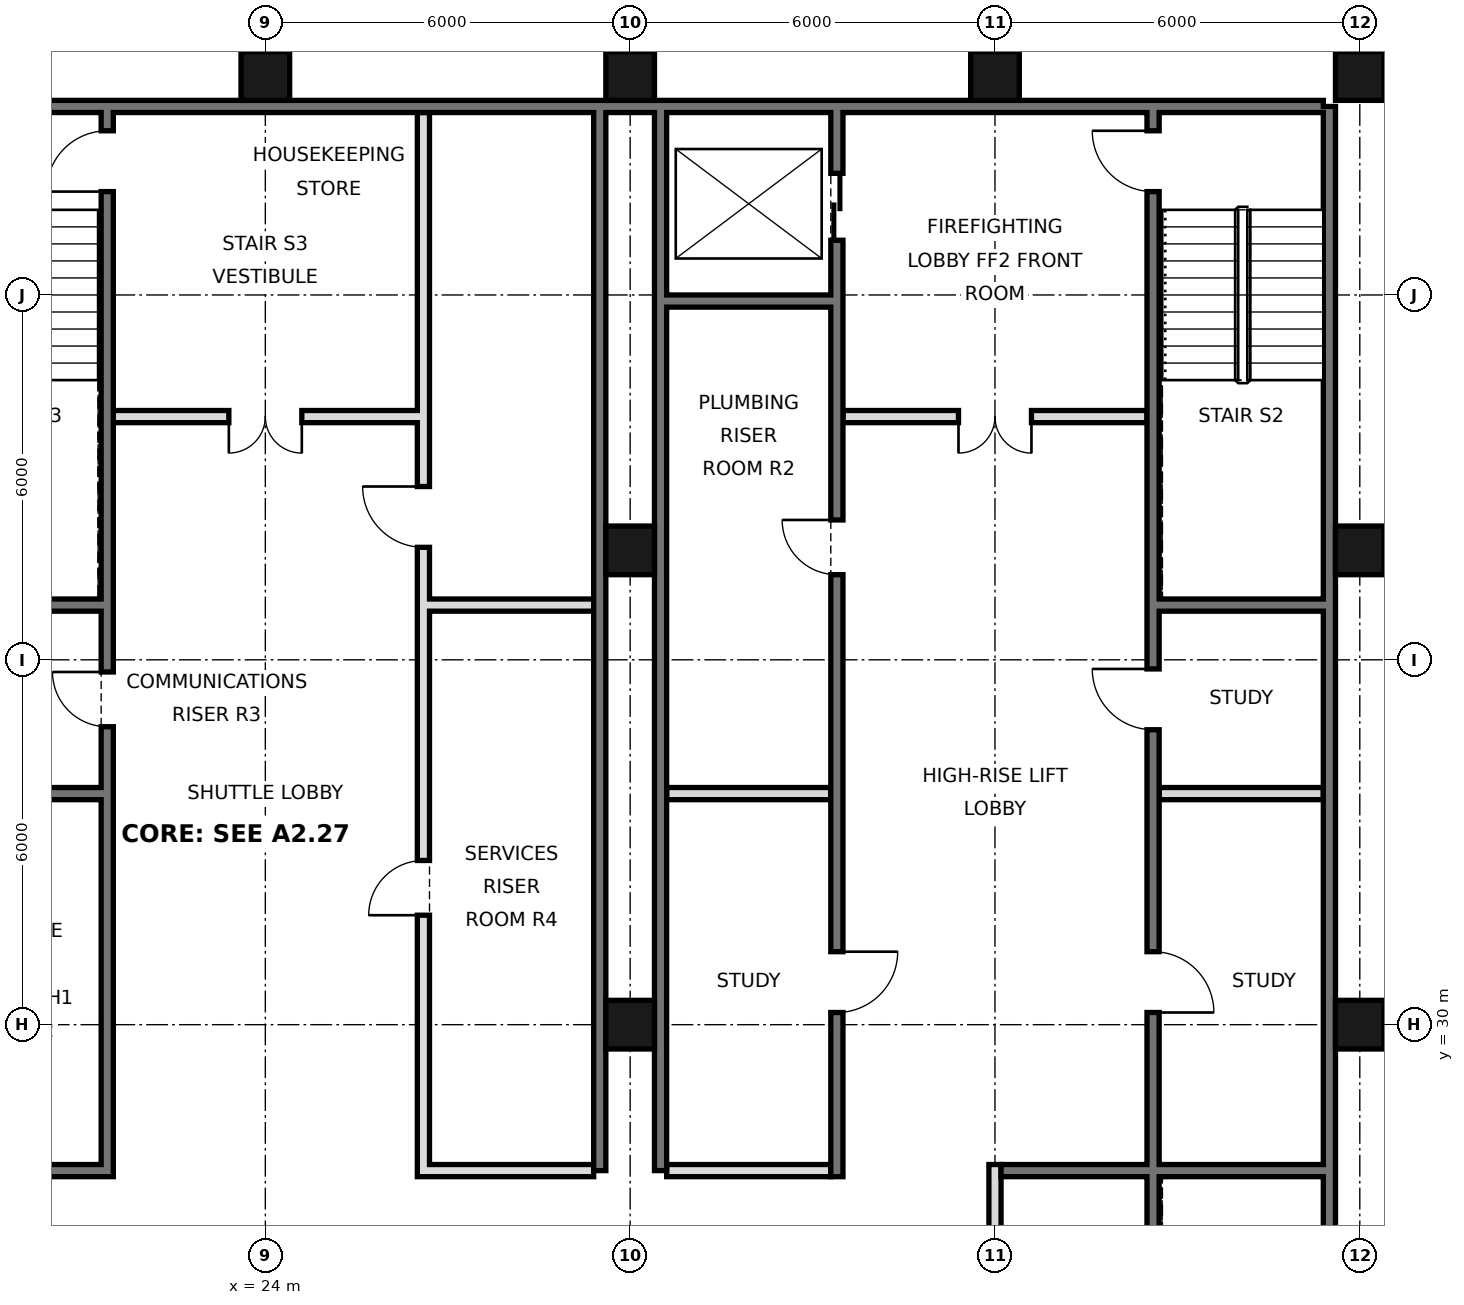
"""IFC4 building model, lengths in metres.
Left out: names, types, materials, properties, quantities, classifications, styles, units other than length and angle.
Written with IfcOpenShell. Run it as: python <this file> out.ifc"""

import sys

from ifc_helpers import new_model, si_unit, direction, frame, frame_2d, origin, origin_2d, place, context, subcontext, project, spatial, rectangle, hollow_rectangle, extrude, element, fill, save


model = new_model("IFC4")
c1 = context("Model", 3, precision=1e-05, world=origin(), true_north=direction((0.0, 1.0)))
c2 = subcontext(c1, "Body", "Model", "MODEL_VIEW")
j1 = project(units=[si_unit("LENGTHUNIT", "METRE"), si_unit("PLANEANGLEUNIT", "RADIAN")], contexts=[c1])
p1 = place(None, origin())
s1 = spatial("IfcSite", under=j1, at=p1, CompositionType="ELEMENT")
p2 = place(p1, origin())
s2 = spatial("IfcBuilding", under=s1, at=p2, CompositionType="ELEMENT")
p3 = place(p2, frame((0.0, 0.0, 107.0)))
s3 = spatial("IfcBuildingStorey", under=s2, at=p3, CompositionType="ELEMENT", Elevation=107.0)
for number, where, z_axis, x_axis in (
    (1, (24.0, 45.6, 0.0), (0.0, 0.0, 1.0), (1.0, 0.0, 0.0)),
    (2, (30.0, 30.0, 0.0), (0.0, 0.0, 1.0), (1.0, 0.0, 0.0)),
    (3, (30.0, 37.8, 0.0), (0.0, 0.0, 1.0), (1.0, 0.0, 0.0)),
    (4, (30.0, 45.6, 0.0), (0.0, 0.0, 1.0), (1.0, 0.0, 0.0)),
    (5, (36.0, 45.6, 0.0), (0.0, 0.0, 1.0), (1.0, 0.0, 0.0)),
    (6, (42.0, 30.0, 0.0), (0.0, 0.0, 1.0), (1.0, 0.0, 0.0)),
    (7, (42.0, 37.8, 0.0), (0.0, 0.0, 1.0), (1.0, 0.0, 0.0)),
    (8, (42.0, 45.6, 0.0), (0.0, 0.0, 1.0), (1.0, 0.0, 0.0)),
):
    element("IfcColumn", number, at=place(p3, frame(where, z_axis=z_axis, x_axis=x_axis)), inside=s3, PredefinedType="COLUMN", context=c2, shape_type="SweptSolid", body=[
        extrude(hollow_rectangle(XDim=0.8, YDim=0.8, WallThickness=0.05, at=origin_2d()), origin(), (0.0, 0.0, 1.0), 3.6),
    ])
p4 = place(p3, frame((41.5, 21.6, 0.0), z_axis=(0.0, 0.0, 1.0), x_axis=(0.0, 1.0, 0.0)))
e9 = element("IfcWall", 9, at=p4, inside=s3, PredefinedType="SOLIDWALL", context=c2, shape_type="SweptSolid", body=[
    extrude(rectangle(XDim=23.5, YDim=0.2, at=frame_2d((11.75, 0.0))), origin(), (0.0, 0.0, 1.0), 3.42),
])
p5 = place(p3, frame((6.6, 45.1, 0.0), z_axis=(0.0, 0.0, 1.0), x_axis=(1.0, 0.0, 0.0)))
e10 = element("IfcWall", 10, at=p5, inside=s3, PredefinedType="SOLIDWALL", context=c2, shape_type="SweptSolid", body=[
    extrude(rectangle(XDim=34.8, YDim=0.2, at=frame_2d((17.4, 0.0))), origin(), (0.0, 0.0, 1.0), 3.42),
])
for number, where, z_axis, x_axis in (
    (11, (29.5, 27.6, 0.0), (0.0, 0.0, 1.0), (0.0, 1.0, 0.0)),
    (12, (30.5, 27.6, 0.0), (0.0, 0.0, 1.0), (0.0, 1.0, 0.0)),
):
    element("IfcWall", number, at=place(p3, frame(where, z_axis=z_axis, x_axis=x_axis)), inside=s3, PredefinedType="SOLIDWALL", context=c2, shape_type="SweptSolid", body=[
        extrude(rectangle(XDim=17.5, YDim=0.2, at=frame_2d((8.75, 0.0))), origin(), (0.0, 0.0, 1.0), 3.42),
    ])
p6 = place(p3, frame((21.4, 27.5, 0.0), z_axis=(0.0, 0.0, 1.0), x_axis=(0.0, 1.0, 0.0)))
e13 = element("IfcWall", 13, at=p6, inside=s3, PredefinedType="SOLIDWALL", context=c2, shape_type="SweptSolid", body=[
    extrude(rectangle(XDim=17.5, YDim=0.2, at=frame_2d((8.75, 0.0))), origin(), (0.0, 0.0, 1.0), 3.42),
])
p7 = place(p6, frame((16.2, 0.0, 0.0)))
e14 = element("IfcOpeningElement", 14, at=p7, cuts=e13, PredefinedType="OPENING", context=c2, shape_type="SweptSolid", body=[
    extrude(rectangle(XDim=1.0, YDim=2.1, at=frame_2d((0.5, 1.05))), frame((0.0, 0.11, 0.0), z_axis=(0.0, -1.0, 0.0), x_axis=(1.0, 0.0, 0.0)), (0.0, 0.0, 1.0), 0.22),
])
p8 = place(p6, frame((7.4, 0.0, 0.0)))
e15 = element("IfcOpeningElement", 15, at=p8, cuts=e13, PredefinedType="OPENING", context=c2, shape_type="SweptSolid", body=[
    extrude(rectangle(XDim=0.9, YDim=2.1, at=frame_2d((0.45, 1.05))), frame((0.0, 0.11, 0.0), z_axis=(0.0, -1.0, 0.0), x_axis=(1.0, 0.0, 0.0)), (0.0, 0.0, 1.0), 0.22),
])
p9 = place(p3, frame((26.6, 27.5, 0.0), z_axis=(0.0, 0.0, 1.0), x_axis=(0.0, 1.0, 0.0)))
e16 = element("IfcWall", 16, at=p9, inside=s3, PredefinedType="SOLIDWALL", context=c2, shape_type="SweptSolid", body=[
    extrude(rectangle(XDim=17.5, YDim=0.2, at=frame_2d((8.75, 0.0))), origin(), (0.0, 0.0, 1.0), 3.42),
])
p10 = place(p9, frame((4.3, 0.0, 0.0)))
e17 = element("IfcOpeningElement", 17, at=p10, cuts=e16, PredefinedType="OPENING", context=c2, shape_type="SweptSolid", body=[
    extrude(rectangle(XDim=0.9, YDim=2.1, at=frame_2d((0.45, 1.05))), frame((0.0, 0.11, 0.0), z_axis=(0.0, -1.0, 0.0), x_axis=(1.0, 0.0, 0.0)), (0.0, 0.0, 1.0), 0.22),
])
p11 = place(p9, frame((10.35, 0.0, 0.0)))
e18 = element("IfcOpeningElement", 18, at=p11, cuts=e16, PredefinedType="OPENING", context=c2, shape_type="SweptSolid", body=[
    extrude(rectangle(XDim=1.0, YDim=2.1, at=frame_2d((0.5, 1.05))), frame((0.0, 0.11, 0.0), z_axis=(0.0, -1.0, 0.0), x_axis=(1.0, 0.0, 0.0)), (0.0, 0.0, 1.0), 0.22),
])
p12 = place(p3, frame((33.4, 27.5, 0.0), z_axis=(0.0, 0.0, 1.0), x_axis=(0.0, 1.0, 0.0)))
e19 = element("IfcWall", 19, at=p12, inside=s3, PredefinedType="SOLIDWALL", context=c2, shape_type="SweptSolid", body=[
    extrude(rectangle(XDim=17.5, YDim=0.2, at=frame_2d((8.75, 0.0))), origin(), (0.0, 0.0, 1.0), 3.42),
])
p13 = place(p12, frame((15.4, 0.0, 0.0)))
e20 = element("IfcOpeningElement", 20, at=p13, cuts=e19, PredefinedType="OPENING", context=c2, shape_type="SweptSolid", body=[
    extrude(rectangle(XDim=1.1, YDim=2.1, at=frame_2d((0.55, 1.05))), frame((0.0, 0.11, 0.0), z_axis=(0.0, -1.0, 0.0), x_axis=(1.0, 0.0, 0.0)), (0.0, 0.0, 1.0), 0.22),
])
p14 = place(p12, frame((2.7, 0.0, 0.0)))
e21 = element("IfcOpeningElement", 21, at=p14, cuts=e19, PredefinedType="OPENING", context=c2, shape_type="SweptSolid", body=[
    extrude(rectangle(XDim=1.0, YDim=2.1, at=frame_2d((0.5, 1.05))), frame((0.0, 0.11, 0.0), z_axis=(0.0, -1.0, 0.0), x_axis=(1.0, 0.0, 0.0)), (0.0, 0.0, 1.0), 0.22),
])
p15 = place(p12, frame((9.9, 0.0, 0.0)))
e22 = element("IfcOpeningElement", 22, at=p15, cuts=e19, PredefinedType="OPENING", context=c2, shape_type="SweptSolid", body=[
    extrude(rectangle(XDim=0.9, YDim=2.1, at=frame_2d((0.45, 1.05))), frame((0.0, 0.11, 0.0), z_axis=(0.0, -1.0, 0.0), x_axis=(1.0, 0.0, 0.0)), (0.0, 0.0, 1.0), 0.22),
])
p16 = place(p3, frame((36.0, 21.6, 0.0), z_axis=(0.0, 0.0, 1.0), x_axis=(0.0, 1.0, 0.0)))
e23 = element("IfcWall", 23, at=p16, inside=s3, PredefinedType="PARTITIONING", context=c2, shape_type="SweptSolid", body=[
    extrude(rectangle(XDim=6.1, YDim=0.2, at=frame_2d((3.05, 0.0))), origin(), (0.0, 0.0, 1.0), 3.42),
])
p17 = place(p3, frame((38.6, 21.6, 0.0), z_axis=(0.0, 0.0, 1.0), x_axis=(0.0, 1.0, 0.0)))
e24 = element("IfcWall", 24, at=p17, inside=s3, PredefinedType="SOLIDWALL", context=c2, shape_type="SweptSolid", body=[
    extrude(rectangle(XDim=23.4, YDim=0.2, at=frame_2d((11.7, 0.0))), origin(), (0.0, 0.0, 1.0), 3.42),
])
p18 = place(p17, frame((8.6, 0.0, 0.0)))
e25 = element("IfcOpeningElement", 25, at=p18, cuts=e24, PredefinedType="OPENING", context=c2, shape_type="SweptSolid", body=[
    extrude(rectangle(XDim=1.0, YDim=2.1, at=frame_2d((0.5, 1.05))), frame((0.0, 0.11, 0.0), z_axis=(0.0, -1.0, 0.0), x_axis=(1.0, 0.0, 0.0)), (0.0, 0.0, 1.0), 0.22),
])
p19 = place(p17, frame((13.25, 0.0, 0.0)))
e26 = element("IfcOpeningElement", 26, at=p19, cuts=e24, PredefinedType="OPENING", context=c2, shape_type="SweptSolid", body=[
    extrude(rectangle(XDim=1.0, YDim=2.1, at=frame_2d((0.5, 1.05))), frame((0.0, 0.11, 0.0), z_axis=(0.0, -1.0, 0.0), x_axis=(1.0, 0.0, 0.0)), (0.0, 0.0, 1.0), 0.22),
])
p20 = place(p17, frame((22.1, 0.0, 0.0)))
e27 = element("IfcOpeningElement", 27, at=p20, cuts=e24, PredefinedType="OPENING", context=c2, shape_type="SweptSolid", body=[
    extrude(rectangle(XDim=1.0, YDim=2.1, at=frame_2d((0.5, 1.05))), frame((0.0, 0.11, 0.0), z_axis=(0.0, -1.0, 0.0), x_axis=(1.0, 0.0, 0.0)), (0.0, 0.0, 1.0), 0.22),
])
p21 = place(p17, frame((0.175, 0.0, 0.0)))
e28 = element("IfcOpeningElement", 28, at=p21, cuts=e24, PredefinedType="OPENING", context=c2, shape_type="SweptSolid", body=[
    extrude(rectangle(XDim=0.9, YDim=2.1, at=frame_2d((0.45, 1.05))), frame((0.0, 0.11, 0.0), z_axis=(0.0, -1.0, 0.0), x_axis=(1.0, 0.0, 0.0)), (0.0, 0.0, 1.0), 0.22),
])
for number, where, z_axis, x_axis in (
    (29, (18.6, 27.6, 0.0), (0.0, 0.0, 1.0), (1.0, 0.0, 0.0)),
    (30, (26.7, 27.6, 0.0), (0.0, 0.0, 1.0), (1.0, 0.0, 0.0)),
):
    element("IfcWall", number, at=place(p3, frame(where, z_axis=z_axis, x_axis=x_axis)), inside=s3, PredefinedType="SOLIDWALL", context=c2, shape_type="SweptSolid", body=[
        extrude(rectangle(XDim=2.7, YDim=0.2, at=frame_2d((1.35, 0.0))), origin(), (0.0, 0.0, 1.0), 3.42),
    ])
p22 = place(p3, frame((30.6, 27.6, 0.0), z_axis=(0.0, 0.0, 1.0), x_axis=(1.0, 0.0, 0.0)))
e31 = element("IfcWall", 31, at=p22, inside=s3, PredefinedType="PARTITIONING", context=c2, shape_type="SweptSolid", body=[
    extrude(rectangle(XDim=2.7, YDim=0.2, at=frame_2d((1.35, 0.0))), origin(), (0.0, 0.0, 1.0), 3.42),
])
p23 = place(p3, frame((36.1, 27.6, 0.0), z_axis=(0.0, 0.0, 1.0), x_axis=(1.0, 0.0, 0.0)))
e32 = element("IfcWall", 32, at=p23, inside=s3, PredefinedType="SOLIDWALL", context=c2, shape_type="SweptSolid", body=[
    extrude(rectangle(XDim=5.3, YDim=0.2, at=frame_2d((2.65, 0.0))), origin(), (0.0, 0.0, 1.0), 3.42),
])
for number, where, z_axis, x_axis in (
    (33, (18.6, 33.8, 0.0), (0.0, 0.0, 1.0), (1.0, 0.0, 0.0)),
    (34, (30.6, 33.8, 0.0), (0.0, 0.0, 1.0), (1.0, 0.0, 0.0)),
):
    element("IfcWall", number, at=place(p3, frame(where, z_axis=z_axis, x_axis=x_axis)), inside=s3, PredefinedType="SOLIDWALL", context=c2, shape_type="SweptSolid", body=[
        extrude(rectangle(XDim=2.7, YDim=0.2, at=frame_2d((1.35, 0.0))), origin(), (0.0, 0.0, 1.0), 3.42),
    ])
p24 = place(p3, frame((38.7, 33.8, 0.0), z_axis=(0.0, 0.0, 1.0), x_axis=(1.0, 0.0, 0.0)))
e35 = element("IfcWall", 35, at=p24, inside=s3, PredefinedType="PARTITIONING", context=c2, shape_type="SweptSolid", body=[
    extrude(rectangle(XDim=2.7, YDim=0.2, at=frame_2d((1.35, 0.0))), origin(), (0.0, 0.0, 1.0), 3.42),
])
for number, where, z_axis, x_axis in (
    (36, (18.6, 36.9, 0.0), (0.0, 0.0, 1.0), (1.0, 0.0, 0.0)),
    (37, (26.7, 36.9, 0.0), (0.0, 0.0, 1.0), (1.0, 0.0, 0.0)),
    (38, (38.7, 36.9, 0.0), (0.0, 0.0, 1.0), (1.0, 0.0, 0.0)),
):
    element("IfcWall", number, at=place(p3, frame(where, z_axis=z_axis, x_axis=x_axis)), inside=s3, PredefinedType="SOLIDWALL", context=c2, shape_type="SweptSolid", body=[
        extrude(rectangle(XDim=2.7, YDim=0.2, at=frame_2d((1.35, 0.0))), origin(), (0.0, 0.0, 1.0), 3.42),
    ])
p25 = place(p3, frame((21.5, 40.0, 0.0), z_axis=(0.0, 0.0, 1.0), x_axis=(1.0, 0.0, 0.0)))
e39 = element("IfcWall", 39, at=p25, inside=s3, PredefinedType="PARTITIONING", context=c2, shape_type="SweptSolid", body=[
    extrude(rectangle(XDim=5.0, YDim=0.2, at=frame_2d((2.5, 0.0))), origin(), (0.0, 0.0, 1.0), 3.42),
])
p26 = place(p25, frame((1.9, 0.0, 0.0)))
e40 = element("IfcOpeningElement", 40, at=p26, cuts=e39, PredefinedType="OPENING", context=c2, shape_type="SweptSolid", body=[
    extrude(rectangle(XDim=1.2, YDim=2.1, at=frame_2d((0.6, 1.05))), frame((0.0, 0.11, 0.0), z_axis=(0.0, -1.0, 0.0), x_axis=(1.0, 0.0, 0.0)), (0.0, 0.0, 1.0), 0.22),
])
p27 = place(p3, frame((33.5, 40.0, 0.0), z_axis=(0.0, 0.0, 1.0), x_axis=(1.0, 0.0, 0.0)))
e41 = element("IfcWall", 41, at=p27, inside=s3, PredefinedType="PARTITIONING", context=c2, shape_type="SweptSolid", body=[
    extrude(rectangle(XDim=5.0, YDim=0.2, at=frame_2d((2.5, 0.0))), origin(), (0.0, 0.0, 1.0), 3.42),
])
p28 = place(p27, frame((1.9, 0.0, 0.0)))
e42 = element("IfcOpeningElement", 42, at=p28, cuts=e41, PredefinedType="OPENING", context=c2, shape_type="SweptSolid", body=[
    extrude(rectangle(XDim=1.2, YDim=2.1, at=frame_2d((0.6, 1.05))), frame((0.0, 0.11, 0.0), z_axis=(0.0, -1.0, 0.0), x_axis=(1.0, 0.0, 0.0)), (0.0, 0.0, 1.0), 0.22),
])
p29 = place(p3, frame((30.6, 41.9, 0.0), z_axis=(0.0, 0.0, 1.0), x_axis=(1.0, 0.0, 0.0)))
e43 = element("IfcWall", 43, at=p29, inside=s3, PredefinedType="SOLIDWALL", context=c2, shape_type="SweptSolid", body=[
    extrude(rectangle(XDim=2.7, YDim=0.2, at=frame_2d((1.35, 0.0))), origin(), (0.0, 0.0, 1.0), 3.42),
])
p30 = place(p26, frame((1.2, 0.0, 0.0), z_axis=(0.0, 0.0, 1.0), x_axis=(-1.0, 0.0, 0.0)))
e44 = element("IfcDoor", 44, at=p30, inside=s3, OperationType="DOUBLE_DOOR_SINGLE_SWING", PredefinedType="DOOR", context=c2, shape_type="SweptSolid", body=[
    extrude(rectangle(XDim=1.2, YDim=2.1, at=frame_2d((0.6, 1.05))), frame((0.0, 0.025, 0.0), z_axis=(0.0, -1.0, 0.0), x_axis=(1.0, 0.0, 0.0)), (0.0, 0.0, 1.0), 0.05),
])
fill(e40, e44)
p31 = place(p28, frame((1.2, 0.0, 0.0), z_axis=(0.0, 0.0, 1.0), x_axis=(-1.0, 0.0, 0.0)))
e45 = element("IfcDoor", 45, at=p31, inside=s3, OperationType="DOUBLE_DOOR_SINGLE_SWING", PredefinedType="DOOR", context=c2, shape_type="SweptSolid", body=[
    extrude(rectangle(XDim=1.2, YDim=2.1, at=frame_2d((0.6, 1.05))), frame((0.0, 0.025, 0.0), z_axis=(0.0, -1.0, 0.0), x_axis=(1.0, 0.0, 0.0)), (0.0, 0.0, 1.0), 0.05),
])
fill(e42, e45)
p32 = place(p13, origin())
e46 = element("IfcDoor", 46, at=p32, inside=s3, OperationType="DOUBLE_DOOR_SLIDING", PredefinedType="DOOR", context=c2, shape_type="SweptSolid", body=[
    extrude(rectangle(XDim=1.1, YDim=2.1, at=frame_2d((0.55, 1.05))), frame((0.0, 0.025, 0.0), z_axis=(0.0, -1.0, 0.0), x_axis=(1.0, 0.0, 0.0)), (0.0, 0.0, 1.0), 0.05),
])
fill(e20, e46)
p33 = place(p18, frame((1.0, 0.0, 0.0), z_axis=(0.0, 0.0, 1.0), x_axis=(-1.0, 0.0, 0.0)))
e47 = element("IfcDoor", 47, at=p33, inside=s3, OperationType="SINGLE_SWING_RIGHT", PredefinedType="DOOR", context=c2, shape_type="SweptSolid", body=[
    extrude(rectangle(XDim=1.0, YDim=2.1, at=frame_2d((0.5, 1.05))), frame((0.0, 0.025, 0.0), z_axis=(0.0, -1.0, 0.0), x_axis=(1.0, 0.0, 0.0)), (0.0, 0.0, 1.0), 0.05),
])
fill(e25, e47)
p34 = place(p19, frame((1.0, 0.0, 0.0), z_axis=(0.0, 0.0, 1.0), x_axis=(-1.0, 0.0, 0.0)))
e48 = element("IfcDoor", 48, at=p34, inside=s3, OperationType="SINGLE_SWING_LEFT", PredefinedType="DOOR", context=c2, shape_type="SweptSolid", body=[
    extrude(rectangle(XDim=1.0, YDim=2.1, at=frame_2d((0.5, 1.05))), frame((0.0, 0.025, 0.0), z_axis=(0.0, -1.0, 0.0), x_axis=(1.0, 0.0, 0.0)), (0.0, 0.0, 1.0), 0.05),
])
fill(e26, e48)
p35 = place(p14, origin())
e49 = element("IfcDoor", 49, at=p35, inside=s3, OperationType="SINGLE_SWING_RIGHT", PredefinedType="DOOR", context=c2, shape_type="SweptSolid", body=[
    extrude(rectangle(XDim=1.0, YDim=2.1, at=frame_2d((0.5, 1.05))), frame((0.0, 0.025, 0.0), z_axis=(0.0, -1.0, 0.0), x_axis=(1.0, 0.0, 0.0)), (0.0, 0.0, 1.0), 0.05),
])
fill(e21, e49)
p36 = place(p20, frame((1.0, 0.0, 0.0), z_axis=(0.0, 0.0, 1.0), x_axis=(-1.0, 0.0, 0.0)))
e50 = element("IfcDoor", 50, at=p36, inside=s3, OperationType="SINGLE_SWING_LEFT", PredefinedType="DOOR", context=c2, shape_type="SweptSolid", body=[
    extrude(rectangle(XDim=1.0, YDim=2.1, at=frame_2d((0.5, 1.05))), frame((0.0, 0.025, 0.0), z_axis=(0.0, -1.0, 0.0), x_axis=(1.0, 0.0, 0.0)), (0.0, 0.0, 1.0), 0.05),
])
fill(e27, e50)
p37 = place(p7, origin())
e51 = element("IfcDoor", 51, at=p37, inside=s3, OperationType="SINGLE_SWING_LEFT", PredefinedType="DOOR", context=c2, shape_type="SweptSolid", body=[
    extrude(rectangle(XDim=1.0, YDim=2.1, at=frame_2d((0.5, 1.05))), frame((0.0, 0.025, 0.0), z_axis=(0.0, -1.0, 0.0), x_axis=(1.0, 0.0, 0.0)), (0.0, 0.0, 1.0), 0.05),
])
fill(e14, e51)
p38 = place(p15, frame((0.9, 0.0, 0.0), z_axis=(0.0, 0.0, 1.0), x_axis=(-1.0, 0.0, 0.0)))
e52 = element("IfcDoor", 52, at=p38, inside=s3, OperationType="SINGLE_SWING_LEFT", PredefinedType="DOOR", context=c2, shape_type="SweptSolid", body=[
    extrude(rectangle(XDim=0.9, YDim=2.1, at=frame_2d((0.45, 1.05))), frame((0.0, 0.025, 0.0), z_axis=(0.0, -1.0, 0.0), x_axis=(1.0, 0.0, 0.0)), (0.0, 0.0, 1.0), 0.05),
])
fill(e22, e52)
p39 = place(p8, frame((0.9, 0.0, 0.0), z_axis=(0.0, 0.0, 1.0), x_axis=(-1.0, 0.0, 0.0)))
e53 = element("IfcDoor", 53, at=p39, inside=s3, OperationType="SINGLE_SWING_LEFT", PredefinedType="DOOR", context=c2, shape_type="SweptSolid", body=[
    extrude(rectangle(XDim=0.9, YDim=2.1, at=frame_2d((0.45, 1.05))), frame((0.0, 0.025, 0.0), z_axis=(0.0, -1.0, 0.0), x_axis=(1.0, 0.0, 0.0)), (0.0, 0.0, 1.0), 0.05),
])
fill(e15, e53)
p40 = place(p10, origin())
e54 = element("IfcDoor", 54, at=p40, inside=s3, OperationType="SINGLE_SWING_LEFT", PredefinedType="DOOR", context=c2, shape_type="SweptSolid", body=[
    extrude(rectangle(XDim=0.9, YDim=2.1, at=frame_2d((0.45, 1.05))), frame((0.0, 0.025, 0.0), z_axis=(0.0, -1.0, 0.0), x_axis=(1.0, 0.0, 0.0)), (0.0, 0.0, 1.0), 0.05),
])
fill(e17, e54)
p41 = place(p11, frame((1.0, 0.0, 0.0), z_axis=(0.0, 0.0, 1.0), x_axis=(-1.0, 0.0, 0.0)))
e55 = element("IfcDoor", 55, at=p41, inside=s3, OperationType="SINGLE_SWING_LEFT", PredefinedType="DOOR", context=c2, shape_type="SweptSolid", body=[
    extrude(rectangle(XDim=1.0, YDim=2.1, at=frame_2d((0.5, 1.05))), frame((0.0, 0.025, 0.0), z_axis=(0.0, -1.0, 0.0), x_axis=(1.0, 0.0, 0.0)), (0.0, 0.0, 1.0), 0.05),
])
fill(e18, e55)
save(model, sys.argv[1])
